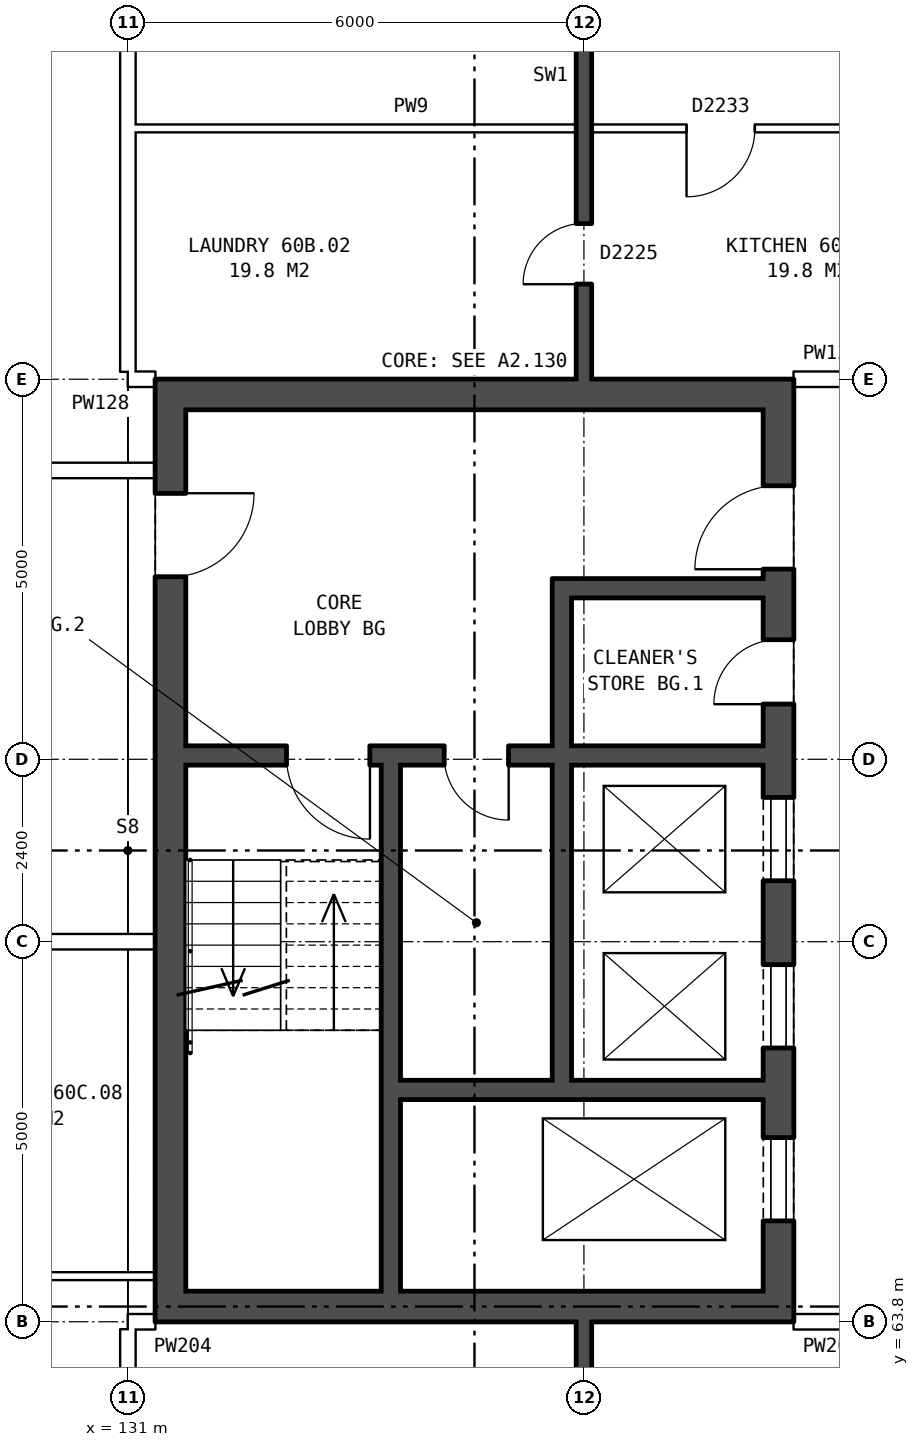
"""IFC4 building model, lengths in metres.
Left out: names, types, materials, properties, quantities, classifications, styles, units other than length and angle.
Written with IfcOpenShell. Run it as: python <this file> out.ifc"""

import sys

from ifc_helpers import new_model, si_unit, direction, frame, frame_2d, origin, place, context, subcontext, project, spatial, rectangle, extrude, element, fill, save


model = new_model("IFC4")
c1 = context("Model", 3, precision=1e-05, world=origin(), true_north=direction((0.0, 1.0)))
c2 = subcontext(c1, "Body", "Model", "MODEL_VIEW")
j1 = project(units=[si_unit("LENGTHUNIT", "METRE"), si_unit("PLANEANGLEUNIT", "RADIAN")], contexts=[c1])
p1 = place(None, origin())
s1 = spatial("IfcSite", under=j1, at=p1, CompositionType="ELEMENT")
p2 = place(p1, origin())
s2 = spatial("IfcBuilding", under=s1, at=p2, CompositionType="ELEMENT")
p3 = place(p2, frame((0.0, 0.0, 212.1)))
s3 = spatial("IfcBuildingStorey", under=s2, at=p3, CompositionType="ELEMENT", Elevation=212.1)
p4 = place(p3, frame((139.56, 63.8, 0.0), z_axis=(0.0, 0.0, 1.0), x_axis=(0.0, 1.0, 0.0)))
e1 = element("IfcWall", 1, at=p4, inside=s3, PredefinedType="SHEAR", context=c2, shape_type="SweptSolid", body=[
    extrude(rectangle(XDim=12.4, YDim=0.4, at=frame_2d((6.2, 0.0))), origin(), (0.0, 0.0, 1.0), 2.85),
])
p5 = place(p4, frame((1.325, 0.0, 0.0)))
e2 = element("IfcOpeningElement", 2, at=p5, cuts=e1, PredefinedType="OPENING", context=c2, shape_type="SweptSolid", body=[
    extrude(rectangle(XDim=1.1, YDim=2.1, at=frame_2d((0.55, 1.05))), frame((0.0, 0.21, 0.0), z_axis=(0.0, -1.0, 0.0), x_axis=(1.0, 0.0, 0.0)), (0.0, 0.0, 1.0), 0.42),
])
p6 = place(p4, frame((3.6, 0.0, 0.0)))
e3 = element("IfcOpeningElement", 3, at=p6, cuts=e1, PredefinedType="OPENING", context=c2, shape_type="SweptSolid", body=[
    extrude(rectangle(XDim=1.1, YDim=2.1, at=frame_2d((0.55, 1.05))), frame((0.0, 0.21, 0.0), z_axis=(0.0, -1.0, 0.0), x_axis=(1.0, 0.0, 0.0)), (0.0, 0.0, 1.0), 0.42),
])
p7 = place(p4, frame((5.8, 0.0, 0.0)))
e4 = element("IfcOpeningElement", 4, at=p7, cuts=e1, PredefinedType="OPENING", context=c2, shape_type="SweptSolid", body=[
    extrude(rectangle(XDim=1.1, YDim=2.1, at=frame_2d((0.55, 1.05))), frame((0.0, 0.21, 0.0), z_axis=(0.0, -1.0, 0.0), x_axis=(1.0, 0.0, 0.0)), (0.0, 0.0, 1.0), 0.42),
])
p8 = place(p4, frame((9.9, 0.0, 0.0)))
e5 = element("IfcOpeningElement", 5, at=p8, cuts=e1, PredefinedType="OPENING", context=c2, shape_type="SweptSolid", body=[
    extrude(rectangle(XDim=1.1, YDim=2.1, at=frame_2d((0.55, 1.05))), frame((0.0, 0.21, 0.0), z_axis=(0.0, -1.0, 0.0), x_axis=(1.0, 0.0, 0.0)), (0.0, 0.0, 1.0), 0.42),
])
p9 = place(p4, frame((8.125, 0.0, 0.0)))
e6 = element("IfcOpeningElement", 6, at=p9, cuts=e1, PredefinedType="OPENING", context=c2, shape_type="SweptSolid", body=[
    extrude(rectangle(XDim=0.85, YDim=2.1, at=frame_2d((0.425, 1.05))), frame((0.0, 0.21, 0.0), z_axis=(0.0, -1.0, 0.0), x_axis=(1.0, 0.0, 0.0)), (0.0, 0.0, 1.0), 0.42),
])
p10 = place(p3, frame((131.56, 63.8, 0.0), z_axis=(0.0, 0.0, 1.0), x_axis=(0.0, 1.0, 0.0)))
e7 = element("IfcWall", 7, at=p10, inside=s3, PredefinedType="SHEAR", context=c2, shape_type="SweptSolid", body=[
    extrude(rectangle(XDim=12.4, YDim=0.4, at=frame_2d((6.2, 0.0))), origin(), (0.0, 0.0, 1.0), 2.85),
])
p11 = place(p10, frame((9.8, 0.0, 0.0)))
e8 = element("IfcOpeningElement", 8, at=p11, cuts=e7, PredefinedType="OPENING", context=c2, shape_type="SweptSolid", body=[
    extrude(rectangle(XDim=1.1, YDim=2.1, at=frame_2d((0.55, 1.05))), frame((0.0, 0.21, 0.0), z_axis=(0.0, -1.0, 0.0), x_axis=(1.0, 0.0, 0.0)), (0.0, 0.0, 1.0), 0.42),
])
for number, where, z_axis, x_axis in (
    (9, (139.36, 64.0, 0.0), (0.0, 0.0, 1.0), (-1.0, 0.0, 0.0)),
    (10, (139.36, 76.0, 0.0), (0.0, 0.0, 1.0), (-1.0, 0.0, 0.0)),
):
    element("IfcWall", number, at=place(p3, frame(where, z_axis=z_axis, x_axis=x_axis)), inside=s3, PredefinedType="SHEAR", context=c2, shape_type="SweptSolid", body=[
        extrude(rectangle(XDim=7.6, YDim=0.4, at=frame_2d((3.8, 0.0))), origin(), (0.0, 0.0, 1.0), 2.85),
    ])
p12 = place(p3, frame((139.36, 66.85, 0.0), z_axis=(0.0, 0.0, 1.0), x_axis=(-1.0, 0.0, 0.0)))
e11 = element("IfcWall", 11, at=p12, inside=s3, PredefinedType="SHEAR", context=c2, shape_type="SweptSolid", body=[
    extrude(rectangle(XDim=4.775, YDim=0.25, at=frame_2d((2.388, 0.0))), origin(), (0.0, 0.0, 1.0), 2.85),
])
p13 = place(p3, frame((139.36, 71.25, 0.0), z_axis=(0.0, 0.0, 1.0), x_axis=(-1.0, 0.0, 0.0)))
e12 = element("IfcWall", 12, at=p13, inside=s3, PredefinedType="SHEAR", context=c2, shape_type="SweptSolid", body=[
    extrude(rectangle(XDim=7.6, YDim=0.25, at=frame_2d((3.8, 0.0))), origin(), (0.0, 0.0, 1.0), 2.85),
])
p14 = place(p13, frame((5.175, 0.0, 0.0)))
e13 = element("IfcOpeningElement", 13, at=p14, cuts=e12, PredefinedType="OPENING", context=c2, shape_type="SweptSolid", body=[
    extrude(rectangle(XDim=1.1, YDim=2.1, at=frame_2d((0.55, 1.05))), frame((0.0, 0.135, 0.0), z_axis=(0.0, -1.0, 0.0), x_axis=(1.0, 0.0, 0.0)), (0.0, 0.0, 1.0), 0.27),
])
p15 = place(p13, frame((3.35, 0.0, 0.0)))
e14 = element("IfcOpeningElement", 14, at=p15, cuts=e12, PredefinedType="OPENING", context=c2, shape_type="SweptSolid", body=[
    extrude(rectangle(XDim=0.85, YDim=2.1, at=frame_2d((0.425, 1.05))), frame((0.0, 0.135, 0.0), z_axis=(0.0, -1.0, 0.0), x_axis=(1.0, 0.0, 0.0)), (0.0, 0.0, 1.0), 0.27),
])
p16 = place(p3, frame((139.36, 73.45, 0.0), z_axis=(0.0, 0.0, 1.0), x_axis=(-1.0, 0.0, 0.0)))
e15 = element("IfcWall", 15, at=p16, inside=s3, PredefinedType="SHEAR", context=c2, shape_type="SweptSolid", body=[
    extrude(rectangle(XDim=2.525, YDim=0.25, at=frame_2d((1.263, 0.0))), origin(), (0.0, 0.0, 1.0), 2.85),
])
p17 = place(p3, frame((136.71, 66.975, 0.0), z_axis=(0.0, 0.0, 1.0), x_axis=(0.0, 1.0, 0.0)))
e16 = element("IfcWall", 16, at=p17, inside=s3, PredefinedType="SHEAR", context=c2, shape_type="SweptSolid", body=[
    extrude(rectangle(XDim=4.15, YDim=0.25, at=frame_2d((2.075, 0.0))), origin(), (0.0, 0.0, 1.0), 2.85),
])
p18 = place(p3, frame((136.71, 71.375, 0.0), z_axis=(0.0, 0.0, 1.0), x_axis=(0.0, 1.0, 0.0)))
e17 = element("IfcWall", 17, at=p18, inside=s3, PredefinedType="SHEAR", context=c2, shape_type="SweptSolid", body=[
    extrude(rectangle(XDim=2.2, YDim=0.25, at=frame_2d((1.1, 0.0))), origin(), (0.0, 0.0, 1.0), 2.85),
])
p19 = place(p3, frame((134.46, 64.2, 0.0), z_axis=(0.0, 0.0, 1.0), x_axis=(0.0, 1.0, 0.0)))
e18 = element("IfcWall", 18, at=p19, inside=s3, PredefinedType="SHEAR", context=c2, shape_type="SweptSolid", body=[
    extrude(rectangle(XDim=6.925, YDim=0.25, at=frame_2d((3.462, 0.0))), origin(), (0.0, 0.0, 1.0), 2.85),
])
p20 = place(p3, frame((131.0, 63.8, 0.0), z_axis=(0.0, 0.0, 1.0), x_axis=(1.0, 0.0, 0.0)))
e19 = element("IfcWall", 19, at=p20, inside=s3, PredefinedType="PARTITIONING", context=c2, shape_type="SweptSolid", body=[
    extrude(rectangle(XDim=0.36, YDim=0.2, at=frame_2d((0.18, 0.0))), origin(), (0.0, 0.0, 1.0), 2.85),
])
p21 = place(p3, frame((139.76, 63.8, 0.0), z_axis=(0.0, 0.0, 1.0), x_axis=(1.0, 0.0, 0.0)))
e20 = element("IfcWall", 20, at=p21, inside=s3, PredefinedType="PARTITIONING", context=c2, shape_type="SweptSolid", body=[
    extrude(rectangle(XDim=3.0, YDim=0.2, at=frame_2d((1.5, 0.0))), origin(), (0.0, 0.0, 1.0), 2.85),
])
p22 = place(p21, frame((1.0, 0.0, 0.0)))
e21 = element("IfcOpeningElement", 21, at=p22, cuts=e20, PredefinedType="OPENING", context=c2, shape_type="SweptSolid", body=[
    extrude(rectangle(XDim=1.0, YDim=2.1, at=frame_2d((0.5, 1.05))), frame((0.0, 0.11, 0.0), z_axis=(0.0, -1.0, 0.0), x_axis=(1.0, 0.0, 0.0)), (0.0, 0.0, 1.0), 0.22),
])
p23 = place(p3, frame((127.912, 64.4, 0.0), z_axis=(0.0, 0.0, 1.0), x_axis=(1.0, 0.0, 0.0)))
e22 = element("IfcWall", 22, at=p23, inside=s3, PredefinedType="PARTITIONING", context=c2, shape_type="SweptSolid", body=[
    extrude(rectangle(XDim=3.448, YDim=0.1, at=frame_2d((1.724, 0.0))), origin(), (0.0, 0.0, 1.0), 2.85),
])
p24 = place(p3, frame((75.64, 68.8, 0.0), z_axis=(0.0, 0.0, 1.0), x_axis=(1.0, 0.0, 0.0)))
e23 = element("IfcWall", 23, at=p24, inside=s3, PredefinedType="PARTITIONING", context=c2, shape_type="SweptSolid", body=[
    extrude(rectangle(XDim=55.72, YDim=0.2, at=frame_2d((27.86, 0.0))), origin(), (0.0, 0.0, 1.0), 2.85),
])
p25 = place(p24, frame((5.191, 0.0, 0.0)))
e24 = element("IfcOpeningElement", 24, at=p25, cuts=e23, PredefinedType="OPENING", context=c2, shape_type="SweptSolid", body=[
    extrude(rectangle(XDim=1.0, YDim=2.1, at=frame_2d((0.5, 1.05))), frame((0.0, 0.11, 0.0), z_axis=(0.0, -1.0, 0.0), x_axis=(1.0, 0.0, 0.0)), (0.0, 0.0, 1.0), 0.22),
])
p26 = place(p24, frame((15.678, 0.0, 0.0)))
e25 = element("IfcOpeningElement", 25, at=p26, cuts=e23, PredefinedType="OPENING", context=c2, shape_type="SweptSolid", body=[
    extrude(rectangle(XDim=1.0, YDim=2.1, at=frame_2d((0.5, 1.05))), frame((0.0, 0.11, 0.0), z_axis=(0.0, -1.0, 0.0), x_axis=(1.0, 0.0, 0.0)), (0.0, 0.0, 1.0), 0.22),
])
p27 = place(p24, frame((22.553, 0.0, 0.0)))
e26 = element("IfcOpeningElement", 26, at=p27, cuts=e23, PredefinedType="OPENING", context=c2, shape_type="SweptSolid", body=[
    extrude(rectangle(XDim=1.0, YDim=2.1, at=frame_2d((0.5, 1.05))), frame((0.0, 0.11, 0.0), z_axis=(0.0, -1.0, 0.0), x_axis=(1.0, 0.0, 0.0)), (0.0, 0.0, 1.0), 0.22),
])
p28 = place(p24, frame((32.866, 0.0, 0.0)))
e27 = element("IfcOpeningElement", 27, at=p28, cuts=e23, PredefinedType="OPENING", context=c2, shape_type="SweptSolid", body=[
    extrude(rectangle(XDim=1.0, YDim=2.1, at=frame_2d((0.5, 1.05))), frame((0.0, 0.11, 0.0), z_axis=(0.0, -1.0, 0.0), x_axis=(1.0, 0.0, 0.0)), (0.0, 0.0, 1.0), 0.22),
])
p29 = place(p24, frame((43.178, 0.0, 0.0)))
e28 = element("IfcOpeningElement", 28, at=p29, cuts=e23, PredefinedType="OPENING", context=c2, shape_type="SweptSolid", body=[
    extrude(rectangle(XDim=1.0, YDim=2.1, at=frame_2d((0.5, 1.05))), frame((0.0, 0.11, 0.0), z_axis=(0.0, -1.0, 0.0), x_axis=(1.0, 0.0, 0.0)), (0.0, 0.0, 1.0), 0.22),
])
p30 = place(p24, frame((50.053, 0.0, 0.0)))
e29 = element("IfcOpeningElement", 29, at=p30, cuts=e23, PredefinedType="OPENING", context=c2, shape_type="SweptSolid", body=[
    extrude(rectangle(XDim=1.0, YDim=2.1, at=frame_2d((0.5, 1.05))), frame((0.0, 0.11, 0.0), z_axis=(0.0, -1.0, 0.0), x_axis=(1.0, 0.0, 0.0)), (0.0, 0.0, 1.0), 0.22),
])
p31 = place(p3, frame((124.475, 75.0, 0.0), z_axis=(0.0, 0.0, 1.0), x_axis=(1.0, 0.0, 0.0)))
e30 = element("IfcWall", 30, at=p31, inside=s3, PredefinedType="PARTITIONING", context=c2, shape_type="SweptSolid", body=[
    extrude(rectangle(XDim=6.885, YDim=0.2, at=frame_2d((3.442, 0.0))), origin(), (0.0, 0.0, 1.0), 2.85),
])
p32 = place(p31, frame((2.992, 0.0, 0.0)))
e31 = element("IfcOpeningElement", 31, at=p32, cuts=e30, PredefinedType="OPENING", context=c2, shape_type="SweptSolid", body=[
    extrude(rectangle(XDim=0.9, YDim=2.1, at=frame_2d((0.45, 1.05))), frame((0.0, 0.11, 0.0), z_axis=(0.0, -1.0, 0.0), x_axis=(1.0, 0.0, 0.0)), (0.0, 0.0, 1.0), 0.22),
])
p33 = place(p3, frame((131.0, 76.2, 0.0), z_axis=(0.0, 0.0, 1.0), x_axis=(1.0, 0.0, 0.0)))
e32 = element("IfcWall", 32, at=p33, inside=s3, PredefinedType="PARTITIONING", context=c2, shape_type="SweptSolid", body=[
    extrude(rectangle(XDim=0.36, YDim=0.2, at=frame_2d((0.18, 0.0))), origin(), (0.0, 0.0, 1.0), 2.85),
])
p34 = place(p3, frame((139.76, 76.2, 0.0), z_axis=(0.0, 0.0, 1.0), x_axis=(1.0, 0.0, 0.0)))
e33 = element("IfcWall", 33, at=p34, inside=s3, PredefinedType="PARTITIONING", context=c2, shape_type="SweptSolid", body=[
    extrude(rectangle(XDim=3.0, YDim=0.2, at=frame_2d((1.5, 0.0))), origin(), (0.0, 0.0, 1.0), 2.85),
])
p35 = place(p34, frame((1.0, 0.0, 0.0)))
e34 = element("IfcOpeningElement", 34, at=p35, cuts=e33, PredefinedType="OPENING", context=c2, shape_type="SweptSolid", body=[
    extrude(rectangle(XDim=1.0, YDim=2.1, at=frame_2d((0.5, 1.05))), frame((0.0, 0.11, 0.0), z_axis=(0.0, -1.0, 0.0), x_axis=(1.0, 0.0, 0.0)), (0.0, 0.0, 1.0), 0.22),
])
p36 = place(p3, frame((131.1, 79.5, 0.0), z_axis=(0.0, 0.0, 1.0), x_axis=(1.0, 0.0, 0.0)))
e35 = element("IfcWall", 35, at=p36, inside=s3, PredefinedType="PARTITIONING", context=c2, shape_type="SweptSolid", body=[
    extrude(rectangle(XDim=11.8, YDim=0.1, at=frame_2d((5.9, 0.0))), origin(), (0.0, 0.0, 1.0), 2.85),
])
p37 = place(p36, frame((7.25, 0.0, 0.0)))
e36 = element("IfcOpeningElement", 36, at=p37, cuts=e35, PredefinedType="OPENING", context=c2, shape_type="SweptSolid", body=[
    extrude(rectangle(XDim=0.9, YDim=2.1, at=frame_2d((0.45, 1.05))), frame((0.0, 0.06, 0.0), z_axis=(0.0, -1.0, 0.0), x_axis=(1.0, 0.0, 0.0)), (0.0, 0.0, 1.0), 0.12),
])
p38 = place(p36, frame((10.2, 0.0, 0.0)))
e37 = element("IfcOpeningElement", 37, at=p38, cuts=e35, PredefinedType="OPENING", context=c2, shape_type="SweptSolid", body=[
    extrude(rectangle(XDim=0.9, YDim=2.1, at=frame_2d((0.45, 1.05))), frame((0.0, 0.06, 0.0), z_axis=(0.0, -1.0, 0.0), x_axis=(1.0, 0.0, 0.0)), (0.0, 0.0, 1.0), 0.12),
])
for number, where, z_axis, x_axis in (
    (38, (131.0, 54.36, 0.0), (0.0, 0.0, 1.0), (0.0, 1.0, 0.0)),
    (39, (131.0, 76.3, 0.0), (0.0, 0.0, 1.0), (0.0, 1.0, 0.0)),
):
    element("IfcWall", number, at=place(p3, frame(where, z_axis=z_axis, x_axis=x_axis)), inside=s3, PredefinedType="PARTITIONING", context=c2, shape_type="SweptSolid", body=[
        extrude(rectangle(XDim=9.34, YDim=0.2, at=frame_2d((4.67, 0.0))), origin(), (0.0, 0.0, 1.0), 2.85),
    ])
p39 = place(p3, frame((137.0, 54.36, 0.0), z_axis=(0.0, 0.0, 1.0), x_axis=(0.0, 1.0, 0.0)))
e40 = element("IfcWall", 40, at=p39, inside=s3, PredefinedType="SOLIDWALL", context=c2, shape_type="SweptSolid", body=[
    extrude(rectangle(XDim=9.44, YDim=0.2, at=frame_2d((4.72, 0.0))), origin(), (0.0, 0.0, 1.0), 2.85),
])
p40 = place(p39, frame((2.62, 0.0, 0.0)))
e41 = element("IfcOpeningElement", 41, at=p40, cuts=e40, PredefinedType="OPENING", context=c2, shape_type="SweptSolid", body=[
    extrude(rectangle(XDim=0.9, YDim=2.1, at=frame_2d((0.45, 1.05))), frame((0.0, 0.11, 0.0), z_axis=(0.0, -1.0, 0.0), x_axis=(1.0, 0.0, 0.0)), (0.0, 0.0, 1.0), 0.22),
])
p41 = place(p39, frame((7.39, 0.0, 0.0)))
e42 = element("IfcOpeningElement", 42, at=p41, cuts=e40, PredefinedType="OPENING", context=c2, shape_type="SweptSolid", body=[
    extrude(rectangle(XDim=0.8, YDim=2.1, at=frame_2d((0.4, 1.05))), frame((0.0, 0.11, 0.0), z_axis=(0.0, -1.0, 0.0), x_axis=(1.0, 0.0, 0.0)), (0.0, 0.0, 1.0), 0.22),
])
p42 = place(p3, frame((137.0, 76.2, 0.0), z_axis=(0.0, 0.0, 1.0), x_axis=(0.0, 1.0, 0.0)))
e43 = element("IfcWall", 43, at=p42, inside=s3, PredefinedType="SOLIDWALL", context=c2, shape_type="SweptSolid", body=[
    extrude(rectangle(XDim=9.44, YDim=0.2, at=frame_2d((4.72, 0.0))), origin(), (0.0, 0.0, 1.0), 2.85),
])
p43 = place(p42, frame((5.92, 0.0, 0.0)))
e44 = element("IfcOpeningElement", 44, at=p43, cuts=e43, PredefinedType="OPENING", context=c2, shape_type="SweptSolid", body=[
    extrude(rectangle(XDim=0.9, YDim=2.1, at=frame_2d((0.45, 1.05))), frame((0.0, 0.11, 0.0), z_axis=(0.0, -1.0, 0.0), x_axis=(1.0, 0.0, 0.0)), (0.0, 0.0, 1.0), 0.22),
])
p44 = place(p42, frame((1.25, 0.0, 0.0)))
e45 = element("IfcOpeningElement", 45, at=p44, cuts=e43, PredefinedType="OPENING", context=c2, shape_type="SweptSolid", body=[
    extrude(rectangle(XDim=0.8, YDim=2.1, at=frame_2d((0.4, 1.05))), frame((0.0, 0.11, 0.0), z_axis=(0.0, -1.0, 0.0), x_axis=(1.0, 0.0, 0.0)), (0.0, 0.0, 1.0), 0.22),
])
p45 = place(p5, origin())
e46 = element("IfcDoor", 46, at=p45, inside=s3, OperationType="DOUBLE_DOOR_SLIDING", PredefinedType="DOOR", context=c2, shape_type="SweptSolid", body=[
    extrude(rectangle(XDim=1.1, YDim=2.1, at=frame_2d((0.55, 1.05))), frame((0.0, 0.185, 0.0), z_axis=(0.0, -1.0, 0.0), x_axis=(1.0, 0.0, 0.0)), (0.0, 0.0, 1.0), 0.05),
])
fill(e2, e46)
p46 = place(p6, origin())
e47 = element("IfcDoor", 47, at=p46, inside=s3, OperationType="DOUBLE_DOOR_SLIDING", PredefinedType="DOOR", context=c2, shape_type="SweptSolid", body=[
    extrude(rectangle(XDim=1.1, YDim=2.1, at=frame_2d((0.55, 1.05))), frame((0.0, 0.185, 0.0), z_axis=(0.0, -1.0, 0.0), x_axis=(1.0, 0.0, 0.0)), (0.0, 0.0, 1.0), 0.05),
])
fill(e3, e47)
p47 = place(p7, origin())
e48 = element("IfcDoor", 48, at=p47, inside=s3, OperationType="DOUBLE_DOOR_SLIDING", PredefinedType="DOOR", context=c2, shape_type="SweptSolid", body=[
    extrude(rectangle(XDim=1.1, YDim=2.1, at=frame_2d((0.55, 1.05))), frame((0.0, 0.185, 0.0), z_axis=(0.0, -1.0, 0.0), x_axis=(1.0, 0.0, 0.0)), (0.0, 0.0, 1.0), 0.05),
])
fill(e4, e48)
p48 = place(p8, origin())
e49 = element("IfcDoor", 49, at=p48, inside=s3, OperationType="SINGLE_SWING_LEFT", PredefinedType="DOOR", context=c2, shape_type="SweptSolid", body=[
    extrude(rectangle(XDim=1.1, YDim=2.1, at=frame_2d((0.55, 1.05))), frame((0.0, 0.185, 0.0), z_axis=(0.0, -1.0, 0.0), x_axis=(1.0, 0.0, 0.0)), (0.0, 0.0, 1.0), 0.05),
])
fill(e5, e49)
p49 = place(p14, origin())
e50 = element("IfcDoor", 50, at=p49, inside=s3, OperationType="SINGLE_SWING_LEFT", PredefinedType="DOOR", context=c2, shape_type="SweptSolid", body=[
    extrude(rectangle(XDim=1.1, YDim=2.1, at=frame_2d((0.55, 1.05))), frame((0.0, 0.025, 0.0), z_axis=(0.0, -1.0, 0.0), x_axis=(1.0, 0.0, 0.0)), (0.0, 0.0, 1.0), 0.05),
])
fill(e13, e50)
p50 = place(p9, origin())
e51 = element("IfcDoor", 51, at=p50, inside=s3, OperationType="SINGLE_SWING_LEFT", PredefinedType="DOOR", context=c2, shape_type="SweptSolid", body=[
    extrude(rectangle(XDim=0.85, YDim=2.1, at=frame_2d((0.425, 1.05))), frame((0.0, 0.185, 0.0), z_axis=(0.0, -1.0, 0.0), x_axis=(1.0, 0.0, 0.0)), (0.0, 0.0, 1.0), 0.05),
])
fill(e6, e51)
p51 = place(p15, origin())
e52 = element("IfcDoor", 52, at=p51, inside=s3, OperationType="SINGLE_SWING_LEFT", PredefinedType="DOOR", context=c2, shape_type="SweptSolid", body=[
    extrude(rectangle(XDim=0.85, YDim=2.1, at=frame_2d((0.425, 1.05))), frame((0.0, 0.025, 0.0), z_axis=(0.0, -1.0, 0.0), x_axis=(1.0, 0.0, 0.0)), (0.0, 0.0, 1.0), 0.05),
])
fill(e14, e52)
p52 = place(p11, frame((1.1, 0.0, 0.0), z_axis=(0.0, 0.0, 1.0), x_axis=(-1.0, 0.0, 0.0)))
e53 = element("IfcDoor", 53, at=p52, inside=s3, OperationType="SINGLE_SWING_LEFT", PredefinedType="DOOR", context=c2, shape_type="SweptSolid", body=[
    extrude(rectangle(XDim=1.1, YDim=2.1, at=frame_2d((0.55, 1.05))), frame((0.0, 0.185, 0.0), z_axis=(0.0, -1.0, 0.0), x_axis=(1.0, 0.0, 0.0)), (0.0, 0.0, 1.0), 0.05),
])
fill(e8, e53)
p53 = place(p37, frame((0.9, 0.0, 0.0), z_axis=(0.0, 0.0, 1.0), x_axis=(-1.0, 0.0, 0.0)))
e54 = element("IfcDoor", 54, at=p53, inside=s3, OperationType="SINGLE_SWING_RIGHT", PredefinedType="DOOR", context=c2, shape_type="SweptSolid", body=[
    extrude(rectangle(XDim=0.9, YDim=2.1, at=frame_2d((0.45, 1.05))), frame((0.0, 0.025, 0.0), z_axis=(0.0, -1.0, 0.0), x_axis=(1.0, 0.0, 0.0)), (0.0, 0.0, 1.0), 0.05),
])
fill(e36, e54)
p54 = place(p44, origin())
e55 = element("IfcDoor", 55, at=p54, inside=s3, OperationType="SINGLE_SWING_LEFT", PredefinedType="DOOR", context=c2, shape_type="SweptSolid", body=[
    extrude(rectangle(XDim=0.8, YDim=2.1, at=frame_2d((0.4, 1.05))), frame((0.0, 0.025, 0.0), z_axis=(0.0, -1.0, 0.0), x_axis=(1.0, 0.0, 0.0)), (0.0, 0.0, 1.0), 0.05),
])
fill(e45, e55)
save(model, sys.argv[1])
